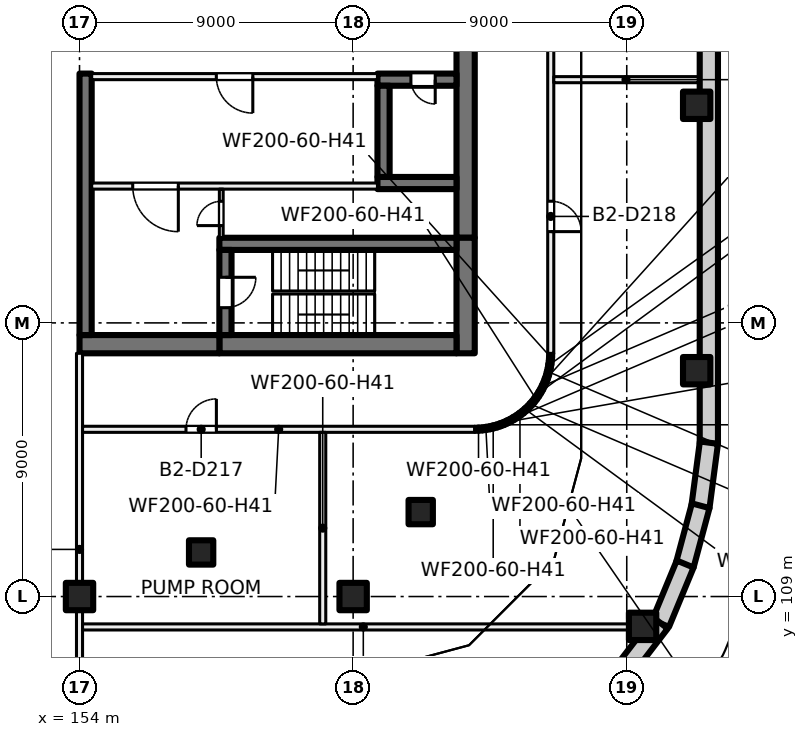
"""IFC4 building model, lengths in metres.
Left out: names, types, materials, properties, quantities, classifications, styles, units other than length and angle.
Written with IfcOpenShell. Run it as: python <this file> out.ifc"""

import sys

from ifc_helpers import new_model, si_unit, direction, frame, frame_2d, origin, origin_2d, place, context, subcontext, project, spatial, rectangle, extrude, element, fill, save


model = new_model("IFC4")
c1 = context("Model", 3, precision=1e-05, world=origin(), true_north=direction((0.0, 1.0)))
c2 = subcontext(c1, "Body", "Model", "MODEL_VIEW")
j1 = project(units=[si_unit("LENGTHUNIT", "METRE"), si_unit("PLANEANGLEUNIT", "RADIAN")], contexts=[c1])
p1 = place(None, origin())
s1 = spatial("IfcSite", under=j1, at=p1, CompositionType="ELEMENT")
p2 = place(p1, origin())
s2 = spatial("IfcBuilding", under=s1, at=p2, CompositionType="ELEMENT")
p3 = place(p2, frame((0.0, 0.0, -9.0)))
s3 = spatial("IfcBuildingStorey", under=s2, at=p3, CompositionType="ELEMENT", Elevation=-9.0)
p4 = place(p3, frame((174.7, 141.978, 0.0), z_axis=(0.0, 0.0, 1.0), x_axis=(0.0, -1.0, 0.0)))
e1 = element("IfcWall", 1, at=p4, inside=s3, PredefinedType="SHEAR", context=c2, shape_type="SweptSolid", body=[
    extrude(rectangle(XDim=27.957, YDim=0.6, at=frame_2d((13.978, 0.0))), origin(), (0.0, 0.0, 1.0), 4.5),
])
p5 = place(p3, frame((174.703, 114.061, 0.0), z_axis=(0.0, 0.0, 1.0), x_axis=(-0.130558200013, -0.991440646942, 0.0)))
e2 = element("IfcWall", 2, at=p5, inside=s3, PredefinedType="SHEAR", context=c2, shape_type="SweptSolid", body=[
    extrude(rectangle(XDim=2.132, YDim=0.6, at=frame_2d((1.066, 0.0))), origin(), (0.0, 0.0, 1.0), 4.5),
])
p6 = place(p3, frame((174.432, 111.986, 0.0), z_axis=(0.0, 0.0, 1.0), x_axis=(-0.258804467146, -0.965929732323, 0.0)))
e3 = element("IfcWall", 3, at=p6, inside=s3, PredefinedType="SHEAR", context=c2, shape_type="SweptSolid", body=[
    extrude(rectangle(XDim=2.022, YDim=0.6, at=frame_2d((1.011, 0.0))), origin(), (0.0, 0.0, 1.0), 4.5),
])
p7 = place(p3, frame((173.921, 110.069, 0.0), z_axis=(0.0, 0.0, 1.0), x_axis=(-0.382375593358, -0.924006983526, 0.0)))
e4 = element("IfcWall", 4, at=p7, inside=s3, PredefinedType="SHEAR", context=c2, shape_type="SweptSolid", body=[
    extrude(rectangle(XDim=2.114, YDim=0.6, at=frame_2d((1.057, 0.0))), origin(), (0.0, 0.0, 1.0), 4.5),
])
p8 = place(p3, frame((173.109, 108.128, 0.0), z_axis=(0.0, 0.0, 1.0), x_axis=(-0.609058260448, -0.793125485267, 0.0)))
e5 = element("IfcWall", 5, at=p8, inside=s3, PredefinedType="SHEAR", context=c2, shape_type="SweptSolid", body=[
    extrude(rectangle(XDim=2.044, YDim=0.6, at=frame_2d((1.022, 0.0))), origin(), (0.0, 0.0, 1.0), 4.5),
])
for number, where, z_axis, x_axis in (
    (6, (154.0, 109.0, 0.0), (0.0, 0.0, 1.0), (1.0, 0.0, 0.0)),
    (7, (163.0, 109.0, 0.0), (0.0, 0.0, 1.0), (1.0, 0.0, 0.0)),
    (8, (174.3, 125.157, 0.0), (0.0, 0.0, 1.0), (1.0, 0.0, 0.0)),
    (9, (174.3, 116.427, 0.0), (0.0, 0.0, 1.0), (1.0, 0.0, 0.0)),
    (10, (172.521, 108.019, 0.0), (0.0, 0.0, 1.0), (1.0, 0.0, 0.0)),
):
    element("IfcColumn", number, at=place(p3, frame(where, z_axis=z_axis, x_axis=x_axis)), inside=s3, PredefinedType="COLUMN", context=c2, shape_type="SweptSolid", body=[
        extrude(rectangle(XDim=0.9, YDim=0.9, at=origin_2d()), origin(), (0.0, 0.0, 1.0), 4.5),
    ])
for number, where, z_axis, x_axis in (
    (11, (165.223, 111.777, 0.0), (0.0, 0.0, 1.0), (1.0, 0.0, 0.0)),
    (12, (158.0, 110.45, 0.0), (0.0, 0.0, 1.0), (1.0, 0.0, 0.0)),
):
    element("IfcColumn", number, at=place(p3, frame(where, z_axis=z_axis, x_axis=x_axis)), inside=s3, PredefinedType="COLUMN", context=c2, shape_type="SweptSolid", body=[
        extrude(rectangle(XDim=0.8, YDim=0.8, at=origin_2d()), origin(), (0.0, 0.0, 1.0), 4.5),
    ])
p9 = place(p3, frame((166.7, 135.2, 0.0), z_axis=(0.0, 0.0, 1.0), x_axis=(0.0, -1.0, 0.0)))
e13 = element("IfcWall", 13, at=p9, inside=s3, PredefinedType="SHEAR", context=c2, shape_type="SweptSolid", body=[
    extrude(rectangle(XDim=14.4, YDim=0.6, at=frame_2d((7.2, 0.0))), origin(), (0.0, 0.0, 1.0), 4.5),
])
p10 = place(p3, frame((166.7, 120.8, 0.0), z_axis=(0.0, 0.0, 1.0), x_axis=(0.0, -1.0, 0.0)))
e14 = element("IfcWall", 14, at=p10, inside=s3, PredefinedType="SHEAR", context=c2, shape_type="SweptSolid", body=[
    extrude(rectangle(XDim=3.8, YDim=0.6, at=frame_2d((1.9, 0.0))), origin(), (0.0, 0.0, 1.0), 4.5),
])
p11 = place(p3, frame((166.4, 117.3, 0.0), z_axis=(0.0, 0.0, 1.0), x_axis=(-1.0, 0.0, 0.0)))
e15 = element("IfcWall", 15, at=p11, inside=s3, PredefinedType="SHEAR", context=c2, shape_type="SweptSolid", body=[
    extrude(rectangle(XDim=7.8, YDim=0.6, at=frame_2d((3.9, 0.0))), origin(), (0.0, 0.0, 1.0), 4.5),
])
p12 = place(p3, frame((158.6, 117.3, 0.0), z_axis=(0.0, 0.0, 1.0), x_axis=(-1.0, 0.0, 0.0)))
e16 = element("IfcWall", 16, at=p12, inside=s3, PredefinedType="SHEAR", context=c2, shape_type="SweptSolid", body=[
    extrude(rectangle(XDim=4.6, YDim=0.6, at=frame_2d((2.3, 0.0))), origin(), (0.0, 0.0, 1.0), 4.5),
])
p13 = place(p3, frame((166.4, 120.6, 0.0), z_axis=(0.0, 0.0, 1.0), x_axis=(-1.0, 0.0, 0.0)))
e17 = element("IfcWall", 17, at=p13, inside=s3, PredefinedType="SHEAR", context=c2, shape_type="SweptSolid", body=[
    extrude(rectangle(XDim=7.8, YDim=0.4, at=frame_2d((3.9, 0.0))), origin(), (0.0, 0.0, 1.0), 4.5),
])
p14 = place(p3, frame((158.8, 120.4, 0.0), z_axis=(0.0, 0.0, 1.0), x_axis=(0.0, -1.0, 0.0)))
e18 = element("IfcWall", 18, at=p14, inside=s3, PredefinedType="SHEAR", context=c2, shape_type="SweptSolid", body=[
    extrude(rectangle(XDim=2.8, YDim=0.4, at=frame_2d((1.4, 0.0))), origin(), (0.0, 0.0, 1.0), 4.5),
])
p15 = place(p14, frame((0.9, 0.0, 0.0)))
e19 = element("IfcOpeningElement", 19, at=p15, cuts=e18, PredefinedType="OPENING", context=c2, shape_type="SweptSolid", body=[
    extrude(rectangle(XDim=1.0, YDim=2.1, at=frame_2d((0.5, 1.05))), frame((0.0, 0.21, 0.0), z_axis=(0.0, -1.0, 0.0), x_axis=(1.0, 0.0, 0.0)), (0.0, 0.0, 1.0), 0.42),
])
p16 = place(p3, frame((166.4, 126.0, 0.0), z_axis=(0.0, 0.0, 1.0), x_axis=(-1.0, 0.0, 0.0)))
e20 = element("IfcWall", 20, at=p16, inside=s3, PredefinedType="SHEAR", context=c2, shape_type="SweptSolid", body=[
    extrude(rectangle(XDim=2.6, YDim=0.4, at=frame_2d((1.3, 0.0))), origin(), (0.0, 0.0, 1.0), 4.5),
])
p17 = place(p16, frame((0.7, 0.0, 0.0)))
e21 = element("IfcOpeningElement", 21, at=p17, cuts=e20, PredefinedType="OPENING", context=c2, shape_type="SweptSolid", body=[
    extrude(rectangle(XDim=0.8, YDim=2.1, at=frame_2d((0.4, 1.05))), frame((0.0, 0.21, 0.0), z_axis=(0.0, -1.0, 0.0), x_axis=(1.0, 0.0, 0.0)), (0.0, 0.0, 1.0), 0.42),
])
p18 = place(p3, frame((166.4, 122.6, 0.0), z_axis=(0.0, 0.0, 1.0), x_axis=(-1.0, 0.0, 0.0)))
e22 = element("IfcWall", 22, at=p18, inside=s3, PredefinedType="SHEAR", context=c2, shape_type="SweptSolid", body=[
    extrude(rectangle(XDim=2.6, YDim=0.4, at=frame_2d((1.3, 0.0))), origin(), (0.0, 0.0, 1.0), 4.5),
])
p19 = place(p3, frame((164.0, 125.8, 0.0), z_axis=(0.0, 0.0, 1.0), x_axis=(0.0, -1.0, 0.0)))
e23 = element("IfcWall", 23, at=p19, inside=s3, PredefinedType="SHEAR", context=c2, shape_type="SweptSolid", body=[
    extrude(rectangle(XDim=3.0, YDim=0.4, at=frame_2d((1.5, 0.0))), origin(), (0.0, 0.0, 1.0), 4.5),
])
p20 = place(p3, frame((154.2, 126.2, 0.0), z_axis=(0.0, 0.0, 1.0), x_axis=(0.0, -1.0, 0.0)))
e24 = element("IfcWall", 24, at=p20, inside=s3, PredefinedType="SHEAR", context=c2, shape_type="SweptSolid", body=[
    extrude(rectangle(XDim=8.6, YDim=0.4, at=frame_2d((4.3, 0.0))), origin(), (0.0, 0.0, 1.0), 4.5),
])
p21 = place(p3, frame((163.8, 126.1, 0.0), z_axis=(0.0, 0.0, 1.0), x_axis=(-1.0, 0.0, 0.0)))
e25 = element("IfcWall", 25, at=p21, inside=s3, PredefinedType="PARTITIONING", context=c2, shape_type="SweptSolid", body=[
    extrude(rectangle(XDim=9.4, YDim=0.2, at=frame_2d((4.7, 0.0))), origin(), (0.0, 0.0, 1.0), 4.125),
])
p22 = place(p21, frame((4.1, 0.0, 0.0)))
e26 = element("IfcOpeningElement", 26, at=p22, cuts=e25, PredefinedType="OPENING", context=c2, shape_type="SweptSolid", body=[
    extrude(rectangle(XDim=1.2, YDim=2.1, at=frame_2d((0.6, 1.05))), frame((0.0, 0.11, 0.0), z_axis=(0.0, -1.0, 0.0), x_axis=(1.0, 0.0, 0.0)), (0.0, 0.0, 1.0), 0.22),
])
p23 = place(p3, frame((163.8, 122.5, 0.0), z_axis=(0.0, 0.0, 1.0), x_axis=(-1.0, 0.0, 0.0)))
e27 = element("IfcWall", 27, at=p23, inside=s3, PredefinedType="PARTITIONING", context=c2, shape_type="SweptSolid", body=[
    extrude(rectangle(XDim=9.4, YDim=0.2, at=frame_2d((4.7, 0.0))), origin(), (0.0, 0.0, 1.0), 4.125),
])
p24 = place(p23, frame((6.55, 0.0, 0.0)))
e28 = element("IfcOpeningElement", 28, at=p24, cuts=e27, PredefinedType="OPENING", context=c2, shape_type="SweptSolid", body=[
    extrude(rectangle(XDim=1.5, YDim=2.1, at=frame_2d((0.75, 1.05))), frame((0.0, 0.11, 0.0), z_axis=(0.0, -1.0, 0.0), x_axis=(1.0, 0.0, 0.0)), (0.0, 0.0, 1.0), 0.22),
])
p25 = place(p3, frame((158.663, 120.8, 0.0), z_axis=(0.0, 0.0, 1.0), x_axis=(0.0, 1.0, 0.0)))
e29 = element("IfcWall", 29, at=p25, inside=s3, PredefinedType="PARTITIONING", context=c2, shape_type="SweptSolid", body=[
    extrude(rectangle(XDim=1.6, YDim=0.125, at=frame_2d((0.8, 0.0))), origin(), (0.0, 0.0, 1.0), 4.125),
])
p26 = place(p25, frame((0.4, 0.0, 0.0)))
e30 = element("IfcOpeningElement", 30, at=p26, cuts=e29, PredefinedType="OPENING", context=c2, shape_type="SweptSolid", body=[
    extrude(rectangle(XDim=0.8, YDim=2.1, at=frame_2d((0.4, 1.05))), frame((0.0, 0.073, 0.0), z_axis=(0.0, -1.0, 0.0), x_axis=(1.0, 0.0, 0.0)), (0.0, 0.0, 1.0), 0.145),
])
p27 = place(p3, frame((154.0, 104.1, 0.0), z_axis=(0.0, 0.0, 1.0), x_axis=(0.0, 1.0, 0.0)))
e31 = element("IfcWall", 31, at=p27, inside=s3, PredefinedType="PARTITIONING", context=c2, shape_type="SweptSolid", body=[
    extrude(rectangle(XDim=12.9, YDim=0.2, at=frame_2d((6.45, 0.0))), origin(), (0.0, 0.0, 1.0), 4.125),
])
p28 = place(p3, frame((154.1, 108.0, 0.0), z_axis=(0.0, 0.0, 1.0), x_axis=(1.0, 0.0, 0.0)))
e32 = element("IfcWall", 32, at=p28, inside=s3, PredefinedType="PARTITIONING", context=c2, shape_type="SweptSolid", body=[
    extrude(rectangle(XDim=18.469, YDim=0.2, at=frame_2d((9.234, 0.0))), origin(), (0.0, 0.0, 1.0), 4.125),
])
p29 = place(p3, frame((167.002, 114.5, 0.0), z_axis=(0.0, 0.0, 1.0), x_axis=(-1.0, 0.0, 0.0)))
e33 = element("IfcWall", 33, at=p29, inside=s3, PredefinedType="PARTITIONING", context=c2, shape_type="SweptSolid", body=[
    extrude(rectangle(XDim=12.902, YDim=0.2, at=frame_2d((6.451, 0.0))), origin(), (0.0, 0.0, 1.0), 4.125),
])
p30 = place(p29, frame((8.5, 0.0, 0.0)))
e34 = element("IfcOpeningElement", 34, at=p30, cuts=e33, PredefinedType="OPENING", context=c2, shape_type="SweptSolid", body=[
    extrude(rectangle(XDim=1.0, YDim=2.1, at=frame_2d((0.5, 1.05))), frame((0.0, 0.11, 0.0), z_axis=(0.0, -1.0, 0.0), x_axis=(1.0, 0.0, 0.0)), (0.0, 0.0, 1.0), 0.22),
])
p31 = place(p3, frame((162.0, 108.1, 0.0), z_axis=(0.0, 0.0, 1.0), x_axis=(0.0, 1.0, 0.0)))
e35 = element("IfcWall", 35, at=p31, inside=s3, PredefinedType="PARTITIONING", context=c2, shape_type="SweptSolid", body=[
    extrude(rectangle(XDim=6.3, YDim=0.2, at=frame_2d((3.15, 0.0))), origin(), (0.0, 0.0, 1.0), 4.125),
])
p32 = place(p3, frame((166.998, 114.5, 0.0), z_axis=(0.0, 0.0, 1.0), x_axis=(0.998874697667, 0.047427190102, 0.0)))
e36 = element("IfcWall", 36, at=p32, inside=s3, PredefinedType="PARTITIONING", context=c2, shape_type="SweptSolid", body=[
    extrude(rectangle(XDim=0.252, YDim=0.2, at=frame_2d((0.126, 0.0))), origin(), (0.0, 0.0, 1.0), 4.125),
])
p33 = place(p3, frame((167.24, 114.511, 0.0), z_axis=(0.0, 0.0, 1.0), x_axis=(0.988852180426, 0.148900521377, 0.0)))
e37 = element("IfcWall", 37, at=p33, inside=s3, PredefinedType="PARTITIONING", context=c2, shape_type="SweptSolid", body=[
    extrude(rectangle(XDim=0.256, YDim=0.2, at=frame_2d((0.128, 0.0))), origin(), (0.0, 0.0, 1.0), 4.125),
])
p34 = place(p3, frame((167.483, 114.547, 0.0), z_axis=(0.0, 0.0, 1.0), x_axis=(0.970366809683, 0.241636616978, 0.0)))
e38 = element("IfcWall", 38, at=p34, inside=s3, PredefinedType="PARTITIONING", context=c2, shape_type="SweptSolid", body=[
    extrude(rectangle(XDim=0.256, YDim=0.2, at=frame_2d((0.128, 0.0))), origin(), (0.0, 0.0, 1.0), 4.125),
])
p35 = place(p3, frame((167.722, 114.606, 0.0), z_axis=(0.0, 0.0, 1.0), x_axis=(0.941459892631, 0.337125007331, 0.0)))
e39 = element("IfcWall", 39, at=p35, inside=s3, PredefinedType="PARTITIONING", context=c2, shape_type="SweptSolid", body=[
    extrude(rectangle(XDim=0.255, YDim=0.2, at=frame_2d((0.127, 0.0))), origin(), (0.0, 0.0, 1.0), 4.125),
])
p36 = place(p3, frame((167.952, 114.688, 0.0), z_axis=(0.0, 0.0, 1.0), x_axis=(0.903444698448, 0.4287046499, 0.0)))
e40 = element("IfcWall", 40, at=p36, inside=s3, PredefinedType="PARTITIONING", context=c2, shape_type="SweptSolid", body=[
    extrude(rectangle(XDim=0.255, YDim=0.2, at=frame_2d((0.127, 0.0))), origin(), (0.0, 0.0, 1.0), 4.125),
])
p37 = place(p3, frame((168.174, 114.793, 0.0), z_axis=(0.0, 0.0, 1.0), x_axis=(0.857998903579, 0.513651517527, 0.0)))
e41 = element("IfcWall", 41, at=p37, inside=s3, PredefinedType="PARTITIONING", context=c2, shape_type="SweptSolid", body=[
    extrude(rectangle(XDim=0.255, YDim=0.2, at=frame_2d((0.127, 0.0))), origin(), (0.0, 0.0, 1.0), 4.125),
])
p38 = place(p3, frame((168.385, 114.918, 0.0), z_axis=(0.0, 0.0, 1.0), x_axis=(0.803201336243, 0.595707657713, 0.0)))
e42 = element("IfcWall", 42, at=p38, inside=s3, PredefinedType="PARTITIONING", context=c2, shape_type="SweptSolid", body=[
    extrude(rectangle(XDim=0.255, YDim=0.2, at=frame_2d((0.128, 0.0))), origin(), (0.0, 0.0, 1.0), 4.125),
])
for number, where, z_axis, x_axis in (
    (43, (168.582, 115.064, 0.0), (0.0, 0.0, 1.0), (0.743, 0.669, 0.0)),
    (44, (168.765, 115.228, 0.0), (0.0, 0.0, 1.0), (0.669, 0.743, 0.0)),
):
    element("IfcWall", number, at=place(p3, frame(where, z_axis=z_axis, x_axis=x_axis)), inside=s3, PredefinedType="PARTITIONING", context=c2, shape_type="SweptSolid", body=[
        extrude(rectangle(XDim=0.256, YDim=0.2, at=frame_2d((0.128, 0.0))), origin(), (0.0, 0.0, 1.0), 4.125),
    ])
p39 = place(p3, frame((168.93, 115.41, 0.0), z_axis=(0.0, 0.0, 1.0), x_axis=(0.595707657713, 0.803201336243, 0.0)))
e45 = element("IfcWall", 45, at=p39, inside=s3, PredefinedType="PARTITIONING", context=c2, shape_type="SweptSolid", body=[
    extrude(rectangle(XDim=0.255, YDim=0.2, at=frame_2d((0.128, 0.0))), origin(), (0.0, 0.0, 1.0), 4.125),
])
p40 = place(p3, frame((169.076, 115.607, 0.0), z_axis=(0.0, 0.0, 1.0), x_axis=(0.513651517527, 0.857998903579, 0.0)))
e46 = element("IfcWall", 46, at=p40, inside=s3, PredefinedType="PARTITIONING", context=c2, shape_type="SweptSolid", body=[
    extrude(rectangle(XDim=0.255, YDim=0.2, at=frame_2d((0.127, 0.0))), origin(), (0.0, 0.0, 1.0), 4.125),
])
p41 = place(p3, frame((169.203, 115.818, 0.0), z_axis=(0.0, 0.0, 1.0), x_axis=(0.4287046499, 0.903444698448, 0.0)))
e47 = element("IfcWall", 47, at=p41, inside=s3, PredefinedType="PARTITIONING", context=c2, shape_type="SweptSolid", body=[
    extrude(rectangle(XDim=0.255, YDim=0.2, at=frame_2d((0.127, 0.0))), origin(), (0.0, 0.0, 1.0), 4.125),
])
p42 = place(p3, frame((169.308, 116.038, 0.0), z_axis=(0.0, 0.0, 1.0), x_axis=(0.337125007331, 0.941459892631, 0.0)))
e48 = element("IfcWall", 48, at=p42, inside=s3, PredefinedType="PARTITIONING", context=c2, shape_type="SweptSolid", body=[
    extrude(rectangle(XDim=0.255, YDim=0.2, at=frame_2d((0.127, 0.0))), origin(), (0.0, 0.0, 1.0), 4.125),
])
p43 = place(p3, frame((169.391, 116.269, 0.0), z_axis=(0.0, 0.0, 1.0), x_axis=(0.241636616978, 0.970366809683, 0.0)))
e49 = element("IfcWall", 49, at=p43, inside=s3, PredefinedType="PARTITIONING", context=c2, shape_type="SweptSolid", body=[
    extrude(rectangle(XDim=0.256, YDim=0.2, at=frame_2d((0.128, 0.0))), origin(), (0.0, 0.0, 1.0), 4.125),
])
p44 = place(p3, frame((169.451, 116.507, 0.0), z_axis=(0.0, 0.0, 1.0), x_axis=(0.148900521377, 0.988852180426, 0.0)))
e50 = element("IfcWall", 50, at=p44, inside=s3, PredefinedType="PARTITIONING", context=c2, shape_type="SweptSolid", body=[
    extrude(rectangle(XDim=0.256, YDim=0.2, at=frame_2d((0.128, 0.0))), origin(), (0.0, 0.0, 1.0), 4.125),
])
p45 = place(p3, frame((169.488, 116.75, 0.0), z_axis=(0.0, 0.0, 1.0), x_axis=(0.047427190102, 0.998874697667, 0.0)))
e51 = element("IfcWall", 51, at=p45, inside=s3, PredefinedType="PARTITIONING", context=c2, shape_type="SweptSolid", body=[
    extrude(rectangle(XDim=0.252, YDim=0.2, at=frame_2d((0.126, 0.0))), origin(), (0.0, 0.0, 1.0), 4.125),
])
p46 = place(p3, frame((169.5, 139.002, 0.0), z_axis=(0.0, 0.0, 1.0), x_axis=(0.0, -1.0, 0.0)))
e52 = element("IfcWall", 52, at=p46, inside=s3, PredefinedType="PARTITIONING", context=c2, shape_type="SweptSolid", body=[
    extrude(rectangle(XDim=22.004, YDim=0.2, at=frame_2d((11.002, 0.0))), origin(), (0.0, 0.0, 1.0), 4.125),
])
p47 = place(p46, frame((17.0, 0.0, 0.0)))
e53 = element("IfcOpeningElement", 53, at=p47, cuts=e52, PredefinedType="OPENING", context=c2, shape_type="SweptSolid", body=[
    extrude(rectangle(XDim=1.0, YDim=2.1, at=frame_2d((0.5, 1.05))), frame((0.0, 0.11, 0.0), z_axis=(0.0, -1.0, 0.0), x_axis=(1.0, 0.0, 0.0)), (0.0, 0.0, 1.0), 0.22),
])
p48 = place(p46, frame((6.004, 0.0, 0.0)))
e54 = element("IfcOpeningElement", 54, at=p48, cuts=e52, PredefinedType="OPENING", context=c2, shape_type="SweptSolid", body=[
    extrude(rectangle(XDim=1.0, YDim=2.1, at=frame_2d((0.5, 1.05))), frame((0.0, 0.11, 0.0), z_axis=(0.0, -1.0, 0.0), x_axis=(1.0, 0.0, 0.0)), (0.0, 0.0, 1.0), 0.22),
])
p49 = place(p3, frame((169.6, 126.0, 0.0), z_axis=(0.0, 0.0, 1.0), x_axis=(1.0, 0.0, 0.0)))
e55 = element("IfcWall", 55, at=p49, inside=s3, PredefinedType="PARTITIONING", context=c2, shape_type="SweptSolid", body=[
    extrude(rectangle(XDim=4.75, YDim=0.2, at=frame_2d((2.375, 0.0))), origin(), (0.0, 0.0, 1.0), 4.125),
])
p50 = place(p17, origin())
e56 = element("IfcDoor", 56, at=p50, inside=s3, OperationType="SINGLE_SWING_LEFT", PredefinedType="DOOR", context=c2, shape_type="SweptSolid", body=[
    extrude(rectangle(XDim=0.8, YDim=2.1, at=frame_2d((0.4, 1.05))), frame((0.0, 0.025, 0.0), z_axis=(0.0, -1.0, 0.0), x_axis=(1.0, 0.0, 0.0)), (0.0, 0.0, 1.0), 0.05),
])
fill(e21, e56)
p51 = place(p22, origin())
e57 = element("IfcDoor", 57, at=p51, inside=s3, OperationType="DOUBLE_DOOR_SINGLE_SWING", PredefinedType="DOOR", context=c2, shape_type="SweptSolid", body=[
    extrude(rectangle(XDim=1.2, YDim=2.1, at=frame_2d((0.6, 1.05))), frame((0.0, 0.025, 0.0), z_axis=(0.0, -1.0, 0.0), x_axis=(1.0, 0.0, 0.0)), (0.0, 0.0, 1.0), 0.05),
])
fill(e26, e57)
p52 = place(p24, origin())
e58 = element("IfcDoor", 58, at=p52, inside=s3, OperationType="DOUBLE_DOOR_SINGLE_SWING", PredefinedType="DOOR", context=c2, shape_type="SweptSolid", body=[
    extrude(rectangle(XDim=1.5, YDim=2.1, at=frame_2d((0.75, 1.05))), frame((0.0, 0.025, 0.0), z_axis=(0.0, -1.0, 0.0), x_axis=(1.0, 0.0, 0.0)), (0.0, 0.0, 1.0), 0.05),
])
fill(e28, e58)
p53 = place(p15, origin())
e59 = element("IfcDoor", 59, at=p53, inside=s3, OperationType="SINGLE_SWING_LEFT", PredefinedType="DOOR", context=c2, shape_type="SweptSolid", body=[
    extrude(rectangle(XDim=1.0, YDim=2.1, at=frame_2d((0.5, 1.05))), frame((0.0, 0.025, 0.0), z_axis=(0.0, -1.0, 0.0), x_axis=(1.0, 0.0, 0.0)), (0.0, 0.0, 1.0), 0.05),
])
fill(e19, e59)
p54 = place(p26, origin())
e60 = element("IfcDoor", 60, at=p54, inside=s3, OperationType="SINGLE_SWING_RIGHT", PredefinedType="DOOR", context=c2, shape_type="SweptSolid", body=[
    extrude(rectangle(XDim=0.8, YDim=2.1, at=frame_2d((0.4, 1.05))), frame((0.0, 0.025, 0.0), z_axis=(0.0, -1.0, 0.0), x_axis=(1.0, 0.0, 0.0)), (0.0, 0.0, 1.0), 0.05),
])
fill(e30, e60)
p55 = place(p30, origin())
e61 = element("IfcDoor", 61, at=p55, inside=s3, OperationType="SINGLE_SWING_LEFT", PredefinedType="DOOR", context=c2, shape_type="SweptSolid", body=[
    extrude(rectangle(XDim=1.0, YDim=2.1, at=frame_2d((0.5, 1.05))), frame((0.0, 0.025, 0.0), z_axis=(0.0, -1.0, 0.0), x_axis=(1.0, 0.0, 0.0)), (0.0, 0.0, 1.0), 0.05),
])
fill(e34, e61)
p56 = place(p47, origin())
e62 = element("IfcDoor", 62, at=p56, inside=s3, OperationType="SINGLE_SWING_RIGHT", PredefinedType="DOOR", context=c2, shape_type="SweptSolid", body=[
    extrude(rectangle(XDim=1.0, YDim=2.1, at=frame_2d((0.5, 1.05))), frame((0.0, 0.025, 0.0), z_axis=(0.0, -1.0, 0.0), x_axis=(1.0, 0.0, 0.0)), (0.0, 0.0, 1.0), 0.05),
])
fill(e53, e62)
save(model, sys.argv[1])
